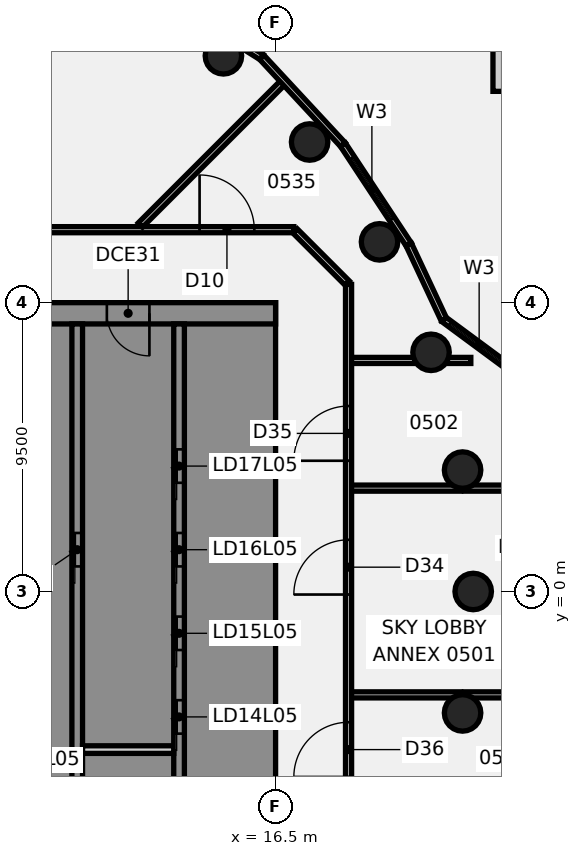
"""IFC4 building model, lengths in metres.
Left out: names, types, materials, properties, quantities, classifications, styles, units other than length and angle.
Written with IfcOpenShell. Run it as: python <this file> out.ifc"""

import sys

from ifc_helpers import new_model, si_unit, direction, frame, frame_2d, origin, origin_2d, place, context, subcontext, project, spatial, polyline, rectangle, circle, outline, extrude, element, fill, save


model = new_model("IFC4")
c1 = context("Model", 3, precision=1e-05, world=origin(), true_north=direction((0.0, 1.0)))
c2 = subcontext(c1, "Body", "Model", "MODEL_VIEW")
j1 = project(units=[si_unit("LENGTHUNIT", "METRE"), si_unit("PLANEANGLEUNIT", "RADIAN")], contexts=[c1])
p1 = place(None, origin())
s1 = spatial("IfcSite", under=j1, at=p1, CompositionType="ELEMENT")
p2 = place(p1, origin())
s2 = spatial("IfcBuilding", under=s1, at=p2, CompositionType="ELEMENT")
p3 = place(p2, frame((0.0, 0.0, 29.5)))
s3 = spatial("IfcBuildingStorey", under=s2, at=p3, CompositionType="ELEMENT", Elevation=29.5)
for number, where, z_axis, x_axis in (
    (1, (23.0, 0.0, -0.6), (0.0, 0.0, 1.0), (1.0, 0.0, 0.0)),
    (2, (22.651, 3.994, -0.6), (0.0, 0.0, 1.0), (1.0, 0.0, 0.0)),
    (3, (21.613, 7.866, -0.6), (0.0, 0.0, 1.0), (1.0, 0.0, 0.0)),
    (4, (19.919, 11.5, -0.6), (0.0, 0.0, 1.0), (1.0, 0.0, 0.0)),
    (5, (17.619, 14.784, -0.6), (0.0, 0.0, 1.0), (1.0, 0.0, 0.0)),
    (6, (14.784, 17.619, -0.6), (0.0, 0.0, 1.0), (1.0, 0.0, 0.0)),
    (7, (22.651, -3.994, -0.6), (0.0, 0.0, 1.0), (1.0, 0.0, 0.0)),
):
    element("IfcColumn", number, at=place(p3, frame(where, z_axis=z_axis, x_axis=x_axis)), inside=s3, PredefinedType="COLUMN", context=c2, shape_type="SweptSolid", body=[
        extrude(circle(Radius=0.6, at=origin_2d()), origin(), (0.0, 0.0, 1.0), 4.96),
    ])
p4 = place(p3, frame((17.142, 11.858, 0.0), z_axis=(0.0, 0.0, 1.0), x_axis=(0.707106781187, -0.707106781187, 0.0)))
e8 = element("IfcWall", 8, at=p4, inside=s3, PredefinedType="PARTITIONING", context=c2, shape_type="SweptSolid", body=[
    extrude(rectangle(XDim=2.426, YDim=0.2, at=frame_2d((1.213, 0.0))), origin(), (0.0, 0.0, 1.0), 3.76),
])
p5 = place(p3, frame((18.985, 3.4, 0.0), z_axis=(0.0, 0.0, 1.0), x_axis=(1.0, 0.0, 0.0)))
e9 = element("IfcWall", 9, at=p5, inside=s3, PredefinedType="PARTITIONING", context=c2, shape_type="SweptSolid", body=[
    extrude(rectangle(XDim=3.605, YDim=0.2, at=frame_2d((1.803, 0.0))), origin(), (0.0, 0.0, 1.0), 3.76),
])
p6 = place(p3, frame((22.711, 3.4, 0.0), z_axis=(0.0, 0.0, 1.0), x_axis=(1.0, 0.0, 0.0)))
e10 = element("IfcWall", 10, at=p6, inside=s3, PredefinedType="PARTITIONING", context=c2, shape_type="SweptSolid", body=[
    extrude(rectangle(XDim=3.004, YDim=0.2, at=frame_2d((1.502, 0.0))), origin(), (0.0, 0.0, 1.0), 3.76),
])
p7 = place(p3, frame((18.985, -3.4, 0.0), z_axis=(0.0, 0.0, 1.0), x_axis=(1.0, 0.0, 0.0)))
e11 = element("IfcWall", 11, at=p7, inside=s3, PredefinedType="PARTITIONING", context=c2, shape_type="SweptSolid", body=[
    extrude(rectangle(XDim=3.605, YDim=0.2, at=frame_2d((1.803, 0.0))), origin(), (0.0, 0.0, 1.0), 3.76),
])
p8 = place(p3, frame((22.711, -3.4, 0.0), z_axis=(0.0, 0.0, 1.0), x_axis=(1.0, 0.0, 0.0)))
e12 = element("IfcWall", 12, at=p8, inside=s3, PredefinedType="PARTITIONING", context=c2, shape_type="SweptSolid", body=[
    extrude(rectangle(XDim=5.804, YDim=0.2, at=frame_2d((2.902, 0.0))), origin(), (0.0, 0.0, 1.0), 3.76),
])
p9 = place(p3, frame((18.985, 7.6, 0.0), z_axis=(0.0, 0.0, 1.0), x_axis=(1.0, 0.0, 0.0)))
e13 = element("IfcWall", 13, at=p9, inside=s3, PredefinedType="PARTITIONING", context=c2, shape_type="SweptSolid", body=[
    extrude(rectangle(XDim=2.089, YDim=0.2, at=frame_2d((1.044, 0.0))), origin(), (0.0, 0.0, 1.0), 3.76),
])
p10 = place(p3, frame((22.152, 7.6, 0.0), z_axis=(0.0, 0.0, 1.0), x_axis=(1.0, 0.0, 0.0)))
e14 = element("IfcWall", 14, at=p10, inside=s3, PredefinedType="PARTITIONING", context=c2, shape_type="SweptSolid", body=[
    extrude(rectangle(XDim=0.77, YDim=0.2, at=frame_2d((0.385, 0.0))), origin(), (0.0, 0.0, 1.0), 3.76),
])
p11 = place(p3, frame((-17.065, 11.9, 0.0), z_axis=(0.0, 0.0, 1.0), x_axis=(1.0, 0.0, 0.0)))
e15 = element("IfcWall", 15, at=p11, inside=s3, PredefinedType="PARTITIONING", context=c2, shape_type="SweptSolid", body=[
    extrude(rectangle(XDim=34.165, YDim=0.2, at=frame_2d((17.083, 0.0))), origin(), (0.0, 0.0, 1.0), 3.76),
])
p12 = place(p11, frame((16.215, 0.0, 0.0)))
e16 = element("IfcOpeningElement", 16, at=p12, cuts=e15, PredefinedType="OPENING", context=c2, shape_type="SweptSolid", body=[
    extrude(rectangle(XDim=1.8, YDim=2.1, at=frame_2d((0.9, 1.05))), frame((0.0, 0.11, 0.0), z_axis=(0.0, -1.0, 0.0), x_axis=(1.0, 0.0, 0.0)), (0.0, 0.0, 1.0), 0.22),
])
p13 = place(p11, frame((6.065, 0.0, 0.0)))
e17 = element("IfcOpeningElement", 17, at=p13, cuts=e15, PredefinedType="OPENING", context=c2, shape_type="SweptSolid", body=[
    extrude(rectangle(XDim=1.8, YDim=2.1, at=frame_2d((0.9, 1.05))), frame((0.0, 0.11, 0.0), z_axis=(0.0, -1.0, 0.0), x_axis=(1.0, 0.0, 0.0)), (0.0, 0.0, 1.0), 0.22),
])
p14 = place(p11, frame((31.065, 0.0, 0.0)))
e18 = element("IfcOpeningElement", 18, at=p14, cuts=e15, PredefinedType="OPENING", context=c2, shape_type="SweptSolid", body=[
    extrude(rectangle(XDim=1.8, YDim=2.1, at=frame_2d((0.9, 1.05))), frame((0.0, 0.11, 0.0), z_axis=(0.0, -1.0, 0.0), x_axis=(1.0, 0.0, 0.0)), (0.0, 0.0, 1.0), 0.22),
])
p15 = place(p3, frame((12.052, 12.052, 0.0), z_axis=(0.0, 0.0, 1.0), x_axis=(0.707106781187, 0.707106781187, 0.0)))
e19 = element("IfcWall", 19, at=p15, inside=s3, PredefinedType="PARTITIONING", context=c2, shape_type="SweptSolid", body=[
    extrude(rectangle(XDim=6.631, YDim=0.2, at=frame_2d((3.315, 0.0))), origin(), (0.0, 0.0, 1.0), 3.76),
])
p16 = place(p3, frame((18.9, -10.1, 0.0), z_axis=(0.0, 0.0, 1.0), x_axis=(0.0, 1.0, 0.0)))
e20 = element("IfcWall", 20, at=p16, inside=s3, PredefinedType="PARTITIONING", context=c2, shape_type="SweptSolid", body=[
    extrude(rectangle(XDim=20.2, YDim=0.2, at=frame_2d((10.1, 0.0))), origin(), (0.0, 0.0, 1.0), 3.76),
])
p17 = place(p16, frame((10.0, 0.0, 0.0)))
e21 = element("IfcOpeningElement", 21, at=p17, cuts=e20, PredefinedType="OPENING", context=c2, shape_type="SweptSolid", body=[
    extrude(rectangle(XDim=1.8, YDim=2.1, at=frame_2d((0.9, 1.05))), frame((0.0, 0.11, 0.0), z_axis=(0.0, -1.0, 0.0), x_axis=(1.0, 0.0, 0.0)), (0.0, 0.0, 1.0), 0.22),
])
p18 = place(p16, frame((14.4, 0.0, 0.0)))
e22 = element("IfcOpeningElement", 22, at=p18, cuts=e20, PredefinedType="OPENING", context=c2, shape_type="SweptSolid", body=[
    extrude(rectangle(XDim=1.8, YDim=2.1, at=frame_2d((0.9, 1.05))), frame((0.0, 0.11, 0.0), z_axis=(0.0, -1.0, 0.0), x_axis=(1.0, 0.0, 0.0)), (0.0, 0.0, 1.0), 0.22),
])
p19 = place(p16, frame((4.0, 0.0, 0.0)))
e23 = element("IfcOpeningElement", 23, at=p19, cuts=e20, PredefinedType="OPENING", context=c2, shape_type="SweptSolid", body=[
    extrude(rectangle(XDim=1.8, YDim=2.1, at=frame_2d((0.9, 1.05))), frame((0.0, 0.11, 0.0), z_axis=(0.0, -1.0, 0.0), x_axis=(1.0, 0.0, 0.0)), (0.0, 0.0, 1.0), 0.22),
])
p20 = place(p3, frame((23.825, 16.45, 0.0), z_axis=(0.0, 0.0, 1.0), x_axis=(0.0, 1.0, 0.0)))
e24 = element("IfcWall", 24, at=p20, inside=s3, PredefinedType="SOLIDWALL", context=c2, shape_type="SweptSolid", body=[
    extrude(rectangle(XDim=27.4, YDim=0.35, at=frame_2d((13.7, 0.0))), origin(), (0.0, 0.0, 1.0), 1.2),
])
p21 = place(p3, frame((24.885, 6.844, 0.0), z_axis=(0.0, 0.0, 1.0), x_axis=(-0.804392246617, 0.594098572278, 0.0)))
e25 = element("IfcWall", 25, at=p21, inside=s3, PredefinedType="SOLIDWALL", context=c2, shape_type="SweptSolid", body=[
    extrude(rectangle(XDim=3.544, YDim=0.2, at=frame_2d((1.772, 0.0))), origin(), (0.0, 0.0, 1.0), 4.36),
])
p22 = place(p21, frame((0.9, 0.0, 1.4)))
e26 = element("IfcOpeningElement", 26, at=p22, cuts=e25, PredefinedType="OPENING", context=c2, shape_type="SweptSolid", body=[
    extrude(rectangle(XDim=2.4, YDim=2.1, at=frame_2d((1.2, 1.05))), frame((0.0, 0.11, 0.0), z_axis=(0.0, -1.0, 0.0), x_axis=(1.0, 0.0, 0.0)), (0.0, 0.0, 1.0), 0.22),
])
p23 = place(p3, frame((22.034, 8.95, 0.0), z_axis=(0.0, 0.0, 1.0), x_axis=(-0.424181121769, 0.90557737159, 0.0)))
e27 = element("IfcWall", 27, at=p23, inside=s3, PredefinedType="SOLIDWALL", context=c2, shape_type="SweptSolid", body=[
    extrude(rectangle(XDim=2.722, YDim=0.2, at=frame_2d((1.361, 0.0))), origin(), (0.0, 0.0, 1.0), 4.36),
])
p24 = place(p3, frame((20.879, 11.416, 0.0), z_axis=(0.0, 0.0, 1.0), x_axis=(-0.550579088084, 0.834783006394, 0.0)))
e28 = element("IfcWall", 28, at=p24, inside=s3, PredefinedType="SOLIDWALL", context=c2, shape_type="SweptSolid", body=[
    extrude(rectangle(XDim=3.93, YDim=0.2, at=frame_2d((1.965, 0.0))), origin(), (0.0, 0.0, 1.0), 4.36),
])
p25 = place(p24, frame((1.0, 0.0, 1.4)))
e29 = element("IfcOpeningElement", 29, at=p25, cuts=e28, PredefinedType="OPENING", context=c2, shape_type="SweptSolid", body=[
    extrude(rectangle(XDim=2.4, YDim=2.1, at=frame_2d((1.2, 1.05))), frame((0.0, 0.11, 0.0), z_axis=(0.0, -1.0, 0.0), x_axis=(1.0, 0.0, 0.0)), (0.0, 0.0, 1.0), 0.22),
])
p26 = place(p3, frame((18.715, 14.696, 0.0), z_axis=(0.0, 0.0, 1.0), x_axis=(-0.680405826691, 0.732835527935, 0.0)))
e30 = element("IfcWall", 30, at=p26, inside=s3, PredefinedType="SOLIDWALL", context=c2, shape_type="SweptSolid", body=[
    extrude(rectangle(XDim=3.93, YDim=0.2, at=frame_2d((1.965, 0.0))), origin(), (0.0, 0.0, 1.0), 4.36),
])
p27 = place(p3, frame((16.041, 17.576, 0.0), z_axis=(0.0, 0.0, 1.0), x_axis=(-0.847351322154, 0.531032707885, 0.0)))
e31 = element("IfcWall", 31, at=p27, inside=s3, PredefinedType="SOLIDWALL", context=c2, shape_type="SweptSolid", body=[
    extrude(rectangle(XDim=8.679, YDim=0.2, at=frame_2d((4.34, 0.0))), origin(), (0.0, 0.0, 1.0), 4.36),
])
p28 = place(p3, origin())
e32 = element("IfcWall", 32, at=p28, inside=s3, PredefinedType="SHEAR", context=c2, shape_type="SweptSolid", body=[
    extrude(outline(polyline([(13.5, -8.8), (15.8, -8.8), (16.5, -8.8), (16.5, 8.8), (15.8, 8.8), (13.5, 8.8), (13.5, 8.125), (15.8, 8.125), (15.8, 5.625), (13.5, 5.625), (13.5, 5.375), (15.8, 5.375), (15.8, 2.875), (13.5, 2.875), (13.5, 2.625), (15.8, 2.625), (15.8, 0.125), (13.5, 0.125), (13.5, -0.125), (15.8, -0.125), (15.8, -2.625), (13.5, -2.625), (13.5, -2.875), (15.8, -2.875), (15.8, -5.375), (13.5, -5.375), (13.5, -5.625), (15.8, -5.625), (15.8, -8.125), (13.5, -8.125), (13.5, -8.8)])), origin(), (0.0, 0.0, 1.0), 4.36),
])
p29 = place(p3, frame((16.5, 9.15, 0.0), z_axis=(0.0, 0.0, 1.0), x_axis=(-1.0, 0.0, 0.0)))
e33 = element("IfcWall", 33, at=p29, inside=s3, PredefinedType="SHEAR", context=c2, shape_type="SweptSolid", body=[
    extrude(rectangle(XDim=13.0, YDim=0.7, at=frame_2d((6.5, 0.0))), origin(), (0.0, 0.0, 1.0), 4.36),
])
p30 = place(p29, frame((4.15, 0.0, 0.0)))
e34 = element("IfcOpeningElement", 34, at=p30, cuts=e33, PredefinedType="OPENING", context=c2, shape_type="SweptSolid", body=[
    extrude(rectangle(XDim=1.4, YDim=2.1, at=frame_2d((0.7, 1.05))), frame((0.0, 0.36, 0.0), z_axis=(0.0, -1.0, 0.0), x_axis=(1.0, 0.0, 0.0)), (0.0, 0.0, 1.0), 0.72),
])
p31 = place(p3, origin())
e35 = element("IfcWall", 35, at=p31, inside=s3, PredefinedType="SHEAR", context=c2, shape_type="SweptSolid", body=[
    extrude(outline(polyline([(9.8, -5.375), (7.5, -5.375), (7.5, -2.875), (9.8, -2.875), (9.8, -2.625), (7.5, -2.625), (7.5, -0.125), (9.8, -0.125), (9.8, 0.125), (7.5, 0.125), (7.5, 2.625), (9.8, 2.625), (9.8, 2.875), (7.5, 2.875), (7.5, 5.375), (9.8, 5.375), (9.8, 5.625), (7.5, 5.625), (7.5, 8.125), (9.8, 8.125), (9.8, 8.8), (7.5, 8.8), (7.15, 8.8), (7.15, -5.625), (7.5, -5.625), (9.8, -5.625), (9.8, -5.375)])), origin(), (0.0, 0.0, 1.0), 4.36),
])
p32 = place(p3, origin())
e36 = element("IfcWall", 36, at=p32, inside=s3, PredefinedType="SHEAR", context=c2, shape_type="SweptSolid", body=[
    extrude(outline(polyline([(7.5, -8.125), (7.5, -8.8), (9.8, -8.8), (9.8, -8.125), (9.8, -5.625), (9.55, -5.625), (9.55, -8.125), (7.5, -8.125)])), origin(), (0.0, 0.0, 1.0), 4.36),
])
p33 = place(p3, frame((13.325, -8.8, 0.0), z_axis=(0.0, 0.0, 1.0), x_axis=(0.0, 1.0, 0.0)))
e37 = element("IfcWall", 37, at=p33, inside=s3, PredefinedType="SHEAR", context=c2, shape_type="SweptSolid", body=[
    extrude(rectangle(XDim=17.6, YDim=0.35, at=frame_2d((8.8, 0.0))), origin(), (0.0, 0.0, 1.0), 4.36),
])
p34 = place(p33, frame((1.225, 0.0, 0.0)))
e38 = element("IfcOpeningElement", 38, at=p34, cuts=e37, PredefinedType="OPENING", context=c2, shape_type="SweptSolid", body=[
    extrude(rectangle(XDim=1.4, YDim=2.1, at=frame_2d((0.7, 1.05))), frame((0.0, 0.185, 0.0), z_axis=(0.0, -1.0, 0.0), x_axis=(1.0, 0.0, 0.0)), (0.0, 0.0, 1.0), 0.37),
])
p35 = place(p33, frame((4.125, 0.0, 0.0)))
e39 = element("IfcOpeningElement", 39, at=p35, cuts=e37, PredefinedType="OPENING", context=c2, shape_type="SweptSolid", body=[
    extrude(rectangle(XDim=1.1, YDim=2.1, at=frame_2d((0.55, 1.05))), frame((0.0, 0.185, 0.0), z_axis=(0.0, -1.0, 0.0), x_axis=(1.0, 0.0, 0.0)), (0.0, 0.0, 1.0), 0.37),
])
p36 = place(p33, frame((6.875, 0.0, 0.0)))
e40 = element("IfcOpeningElement", 40, at=p36, cuts=e37, PredefinedType="OPENING", context=c2, shape_type="SweptSolid", body=[
    extrude(rectangle(XDim=1.1, YDim=2.1, at=frame_2d((0.55, 1.05))), frame((0.0, 0.185, 0.0), z_axis=(0.0, -1.0, 0.0), x_axis=(1.0, 0.0, 0.0)), (0.0, 0.0, 1.0), 0.37),
])
p37 = place(p33, frame((9.625, 0.0, 0.0)))
e41 = element("IfcOpeningElement", 41, at=p37, cuts=e37, PredefinedType="OPENING", context=c2, shape_type="SweptSolid", body=[
    extrude(rectangle(XDim=1.1, YDim=2.1, at=frame_2d((0.55, 1.05))), frame((0.0, 0.185, 0.0), z_axis=(0.0, -1.0, 0.0), x_axis=(1.0, 0.0, 0.0)), (0.0, 0.0, 1.0), 0.37),
])
p38 = place(p33, frame((12.375, 0.0, 0.0)))
e42 = element("IfcOpeningElement", 42, at=p38, cuts=e37, PredefinedType="OPENING", context=c2, shape_type="SweptSolid", body=[
    extrude(rectangle(XDim=1.1, YDim=2.1, at=frame_2d((0.55, 1.05))), frame((0.0, 0.185, 0.0), z_axis=(0.0, -1.0, 0.0), x_axis=(1.0, 0.0, 0.0)), (0.0, 0.0, 1.0), 0.37),
])
p39 = place(p3, frame((9.975, -8.8, 0.0), z_axis=(0.0, 0.0, 1.0), x_axis=(0.0, 1.0, 0.0)))
e43 = element("IfcWall", 43, at=p39, inside=s3, PredefinedType="SHEAR", context=c2, shape_type="SweptSolid", body=[
    extrude(rectangle(XDim=17.6, YDim=0.35, at=frame_2d((8.8, 0.0))), origin(), (0.0, 0.0, 1.0), 4.36),
])
p40 = place(p39, frame((9.625, 0.0, 0.0)))
e44 = element("IfcOpeningElement", 44, at=p40, cuts=e43, PredefinedType="OPENING", context=c2, shape_type="SweptSolid", body=[
    extrude(rectangle(XDim=1.1, YDim=2.1, at=frame_2d((0.55, 1.05))), frame((0.0, 0.185, 0.0), z_axis=(0.0, -1.0, 0.0), x_axis=(1.0, 0.0, 0.0)), (0.0, 0.0, 1.0), 0.37),
])
p41 = place(p3, frame((13.15, -5.2, 0.0), z_axis=(0.0, 0.0, 1.0), x_axis=(-1.0, 0.0, 0.0)))
e45 = element("IfcWall", 45, at=p41, inside=s3, PredefinedType="PARTITIONING", context=c2, shape_type="SweptSolid", body=[
    extrude(rectangle(XDim=3.0, YDim=0.25, at=frame_2d((1.5, 0.0))), origin(), (0.0, 0.0, 1.0), 4.36),
])
p42 = place(p14, origin())
e46 = element("IfcDoor", 46, at=p42, inside=s3, OperationType="DOUBLE_DOOR_SINGLE_SWING", PredefinedType="DOOR", context=c2, shape_type="SweptSolid", body=[
    extrude(rectangle(XDim=1.8, YDim=2.1, at=frame_2d((0.9, 1.05))), frame((0.0, 0.025, 0.0), z_axis=(0.0, -1.0, 0.0), x_axis=(1.0, 0.0, 0.0)), (0.0, 0.0, 1.0), 0.05),
])
fill(e18, e46)
p43 = place(p17, origin())
e47 = element("IfcDoor", 47, at=p43, inside=s3, OperationType="DOUBLE_DOOR_SINGLE_SWING", PredefinedType="DOOR", context=c2, shape_type="SweptSolid", body=[
    extrude(rectangle(XDim=1.8, YDim=2.1, at=frame_2d((0.9, 1.05))), frame((0.0, 0.025, 0.0), z_axis=(0.0, -1.0, 0.0), x_axis=(1.0, 0.0, 0.0)), (0.0, 0.0, 1.0), 0.05),
])
fill(e21, e47)
p44 = place(p18, frame((1.8, 0.0, 0.0), z_axis=(0.0, 0.0, 1.0), x_axis=(-1.0, 0.0, 0.0)))
e48 = element("IfcDoor", 48, at=p44, inside=s3, OperationType="DOUBLE_DOOR_SINGLE_SWING", PredefinedType="DOOR", context=c2, shape_type="SweptSolid", body=[
    extrude(rectangle(XDim=1.8, YDim=2.1, at=frame_2d((0.9, 1.05))), frame((0.0, 0.025, 0.0), z_axis=(0.0, -1.0, 0.0), x_axis=(1.0, 0.0, 0.0)), (0.0, 0.0, 1.0), 0.05),
])
fill(e22, e48)
p45 = place(p19, frame((1.8, 0.0, 0.0), z_axis=(0.0, 0.0, 1.0), x_axis=(-1.0, 0.0, 0.0)))
e49 = element("IfcDoor", 49, at=p45, inside=s3, OperationType="DOUBLE_DOOR_SINGLE_SWING", PredefinedType="DOOR", context=c2, shape_type="SweptSolid", body=[
    extrude(rectangle(XDim=1.8, YDim=2.1, at=frame_2d((0.9, 1.05))), frame((0.0, 0.025, 0.0), z_axis=(0.0, -1.0, 0.0), x_axis=(1.0, 0.0, 0.0)), (0.0, 0.0, 1.0), 0.05),
])
fill(e23, e49)
p46 = place(p22, origin())
e50 = element("IfcWindow", 50, at=p46, inside=s3, PartitioningType="SINGLE_PANEL", PredefinedType="WINDOW", context=c2, shape_type="SweptSolid", body=[
    extrude(rectangle(XDim=2.4, YDim=2.1, at=frame_2d((1.2, 1.05))), frame((0.0, 0.03, 0.0), z_axis=(0.0, -1.0, 0.0), x_axis=(1.0, 0.0, 0.0)), (0.0, 0.0, 1.0), 0.06),
])
fill(e26, e50)
p47 = place(p25, origin())
e51 = element("IfcWindow", 51, at=p47, inside=s3, PartitioningType="SINGLE_PANEL", PredefinedType="WINDOW", context=c2, shape_type="SweptSolid", body=[
    extrude(rectangle(XDim=2.4, YDim=2.1, at=frame_2d((1.2, 1.05))), frame((0.0, 0.03, 0.0), z_axis=(0.0, -1.0, 0.0), x_axis=(1.0, 0.0, 0.0)), (0.0, 0.0, 1.0), 0.06),
])
fill(e29, e51)
p48 = place(p35, origin())
e52 = element("IfcDoor", 52, at=p48, inside=s3, OperationType="SLIDING_TO_LEFT", PredefinedType="DOOR", context=c2, shape_type="SweptSolid", body=[
    extrude(rectangle(XDim=1.1, YDim=2.1, at=frame_2d((0.55, 1.05))), frame((0.0, 0.025, 0.0), z_axis=(0.0, -1.0, 0.0), x_axis=(1.0, 0.0, 0.0)), (0.0, 0.0, 1.0), 0.05),
])
fill(e39, e52)
p49 = place(p36, origin())
e53 = element("IfcDoor", 53, at=p49, inside=s3, OperationType="SLIDING_TO_LEFT", PredefinedType="DOOR", context=c2, shape_type="SweptSolid", body=[
    extrude(rectangle(XDim=1.1, YDim=2.1, at=frame_2d((0.55, 1.05))), frame((0.0, 0.025, 0.0), z_axis=(0.0, -1.0, 0.0), x_axis=(1.0, 0.0, 0.0)), (0.0, 0.0, 1.0), 0.05),
])
fill(e40, e53)
p50 = place(p37, origin())
e54 = element("IfcDoor", 54, at=p50, inside=s3, OperationType="SLIDING_TO_LEFT", PredefinedType="DOOR", context=c2, shape_type="SweptSolid", body=[
    extrude(rectangle(XDim=1.1, YDim=2.1, at=frame_2d((0.55, 1.05))), frame((0.0, 0.025, 0.0), z_axis=(0.0, -1.0, 0.0), x_axis=(1.0, 0.0, 0.0)), (0.0, 0.0, 1.0), 0.05),
])
fill(e41, e54)
p51 = place(p38, origin())
e55 = element("IfcDoor", 55, at=p51, inside=s3, OperationType="SLIDING_TO_LEFT", PredefinedType="DOOR", context=c2, shape_type="SweptSolid", body=[
    extrude(rectangle(XDim=1.1, YDim=2.1, at=frame_2d((0.55, 1.05))), frame((0.0, 0.025, 0.0), z_axis=(0.0, -1.0, 0.0), x_axis=(1.0, 0.0, 0.0)), (0.0, 0.0, 1.0), 0.05),
])
fill(e42, e55)
p52 = place(p40, origin())
e56 = element("IfcDoor", 56, at=p52, inside=s3, OperationType="SLIDING_TO_LEFT", PredefinedType="DOOR", context=c2, shape_type="SweptSolid", body=[
    extrude(rectangle(XDim=1.1, YDim=2.1, at=frame_2d((0.55, 1.05))), frame((0.0, 0.025, 0.0), z_axis=(0.0, -1.0, 0.0), x_axis=(1.0, 0.0, 0.0)), (0.0, 0.0, 1.0), 0.05),
])
fill(e44, e56)
p53 = place(p30, origin())
e57 = element("IfcDoor", 57, at=p53, inside=s3, OperationType="SINGLE_SWING_LEFT", PredefinedType="DOOR", context=c2, shape_type="SweptSolid", body=[
    extrude(rectangle(XDim=1.4, YDim=2.1, at=frame_2d((0.7, 1.05))), frame((0.0, 0.025, 0.0), z_axis=(0.0, -1.0, 0.0), x_axis=(1.0, 0.0, 0.0)), (0.0, 0.0, 1.0), 0.05),
])
fill(e34, e57)
save(model, sys.argv[1])
